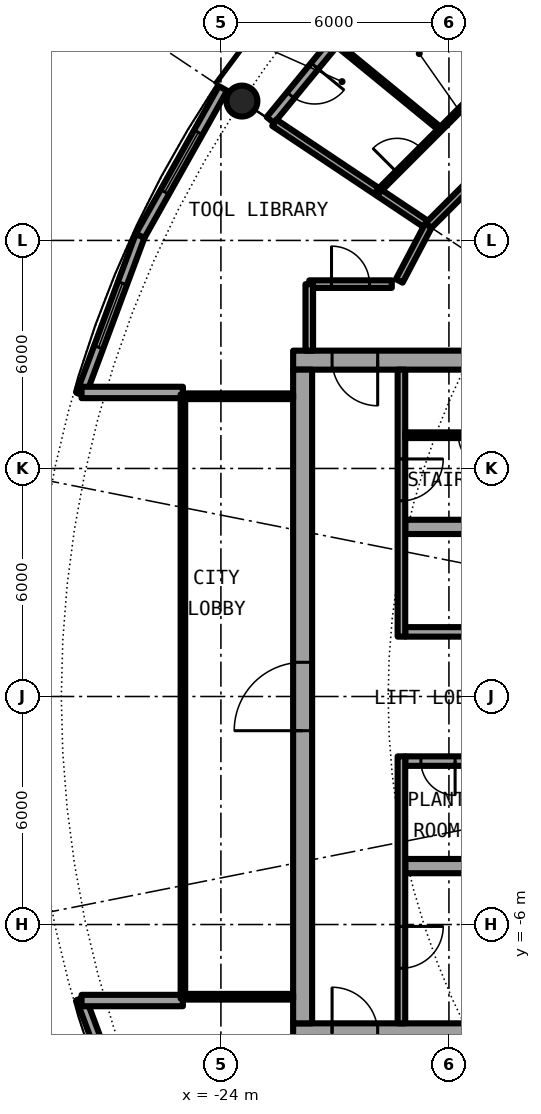
"""IFC4 building model, lengths in metres.
Left out: names, types, materials, properties, quantities, classifications, styles, units other than length and angle.
Written with IfcOpenShell. Run it as: python <this file> out.ifc"""

import sys

from ifc_helpers import new_model, si_unit, direction, frame, frame_2d, origin, origin_2d, place, context, subcontext, project, spatial, rectangle, hollow_circle, extrude, element, fill, save


model = new_model("IFC4")
c1 = context("Model", 3, precision=1e-05, world=origin(), true_north=direction((0.0, 1.0)))
c2 = subcontext(c1, "Body", "Model", "MODEL_VIEW")
j1 = project(units=[si_unit("LENGTHUNIT", "METRE"), si_unit("PLANEANGLEUNIT", "RADIAN")], contexts=[c1])
p1 = place(None, origin())
s1 = spatial("IfcSite", under=j1, at=p1, CompositionType="ELEMENT")
p2 = place(p1, origin())
s2 = spatial("IfcBuilding", under=s1, at=p2, CompositionType="ELEMENT")
p3 = place(p2, frame((0.0, 0.0, 167.7)))
s3 = spatial("IfcBuildingStorey", under=s2, at=p3, CompositionType="ELEMENT", Elevation=167.7)
p4 = place(p3, frame((-23.448, 15.667, 0.0), z_axis=(0.0, 0.0, 1.0), x_axis=(1.0, 0.0, 0.0)))
e1 = element("IfcColumn", 1, at=p4, inside=s3, PredefinedType="COLUMN", context=c2, shape_type="SweptSolid", body=[
    extrude(hollow_circle(Radius=0.406, WallThickness=0.04, at=origin_2d()), origin(), (0.0, 0.0, 1.0), 3.05),
])
p5 = place(p3, frame((-19.304, 19.304, 0.0), z_axis=(0.0, 0.0, 1.0), x_axis=(-0.634382322723, -0.773019449054, 0.0)))
e2 = element("IfcWall", 2, at=p5, inside=s3, PredefinedType="SOLIDWALL", context=c2, shape_type="SweptSolid", body=[
    extrude(rectangle(XDim=5.352, YDim=0.25, at=frame_2d((2.676, 0.0))), origin(), (0.0, 0.0, 1.0), 2.7),
])
p6 = place(p5, frame((0.441, 0.0, 0.3)))
e3 = element("IfcOpeningElement", 3, at=p6, cuts=e2, PredefinedType="OPENING", context=c2, shape_type="SweptSolid", body=[
    extrude(rectangle(XDim=1.8, YDim=2.1, at=frame_2d((0.9, 1.05))), frame((0.0, 0.135, 0.0), z_axis=(0.0, -1.0, 0.0), x_axis=(1.0, 0.0, 0.0)), (0.0, 0.0, 1.0), 0.27),
])
p7 = place(p5, frame((3.51, 0.0, 0.0)))
e4 = element("IfcOpeningElement", 4, at=p7, cuts=e2, PredefinedType="OPENING", context=c2, shape_type="SweptSolid", body=[
    extrude(rectangle(XDim=1.0, YDim=2.2, at=frame_2d((0.5, 1.1))), frame((0.0, 0.135, 0.0), z_axis=(0.0, -1.0, 0.0), x_axis=(1.0, 0.0, 0.0)), (0.0, 0.0, 1.0), 0.27),
])
p8 = place(p3, frame((-27.682, -7.945, 0.0), z_axis=(0.0, 0.0, 1.0), x_axis=(0.349247811493, -0.937030397675, 0.0)))
e5 = element("IfcWall", 5, at=p8, inside=s3, PredefinedType="SOLIDWALL", context=c2, shape_type="SweptSolid", body=[
    extrude(rectangle(XDim=4.452, YDim=0.25, at=frame_2d((2.226, 0.0))), origin(), (0.0, 0.0, 1.0), 2.7),
])
p9 = place(p8, frame((1.327, 0.0, 0.3)))
e6 = element("IfcOpeningElement", 6, at=p9, cuts=e5, PredefinedType="OPENING", context=c2, shape_type="SweptSolid", body=[
    extrude(rectangle(XDim=1.8, YDim=2.1, at=frame_2d((0.9, 1.05))), frame((0.0, 0.135, 0.0), z_axis=(0.0, -1.0, 0.0), x_axis=(1.0, 0.0, 0.0)), (0.0, 0.0, 1.0), 0.27),
])
p10 = place(p3, frame((-23.946, 16.0, 0.0), z_axis=(0.0, 0.0, 1.0), x_axis=(-0.489696356642, -0.871893042919, 0.0)))
e7 = element("IfcWall", 7, at=p10, inside=s3, PredefinedType="SOLIDWALL", context=c2, shape_type="SweptSolid", body=[
    extrude(rectangle(XDim=4.454, YDim=0.25, at=frame_2d((2.227, 0.0))), origin(), (0.0, 0.0, 1.0), 2.7),
])
p11 = place(p10, frame((1.327, 0.0, 0.3)))
e8 = element("IfcOpeningElement", 8, at=p11, cuts=e7, PredefinedType="OPENING", context=c2, shape_type="SweptSolid", body=[
    extrude(rectangle(XDim=1.8, YDim=2.1, at=frame_2d((0.9, 1.05))), frame((0.0, 0.135, 0.0), z_axis=(0.0, -1.0, 0.0), x_axis=(1.0, 0.0, 0.0)), (0.0, 0.0, 1.0), 0.27),
])
p12 = place(p3, frame((-26.127, 12.117, 0.0), z_axis=(0.0, 0.0, 1.0), x_axis=(-0.349247811493, -0.937030397675, 0.0)))
e9 = element("IfcWall", 9, at=p12, inside=s3, PredefinedType="SOLIDWALL", context=c2, shape_type="SweptSolid", body=[
    extrude(rectangle(XDim=4.452, YDim=0.25, at=frame_2d((2.226, 0.0))), origin(), (0.0, 0.0, 1.0), 2.7),
])
p13 = place(p12, frame((1.327, 0.0, 0.3)))
e10 = element("IfcOpeningElement", 10, at=p13, cuts=e9, PredefinedType="OPENING", context=c2, shape_type="SweptSolid", body=[
    extrude(rectangle(XDim=1.8, YDim=2.1, at=frame_2d((0.9, 1.05))), frame((0.0, 0.135, 0.0), z_axis=(0.0, -1.0, 0.0), x_axis=(1.0, 0.0, 0.0)), (0.0, 0.0, 1.0), 0.27),
])
for number, where, z_axis, x_axis in (
    (11, (-25.0, 8.0, 0.0), (0.0, 0.0, 1.0), (-1.0, 0.0, 0.0)),
    (12, (-25.0, -8.0, 0.0), (0.0, 0.0, 1.0), (-1.0, 0.0, 0.0)),
):
    element("IfcWall", number, at=place(p3, frame(where, z_axis=z_axis, x_axis=x_axis)), inside=s3, PredefinedType="SOLIDWALL", context=c2, shape_type="SweptSolid", body=[
        extrude(rectangle(XDim=2.667, YDim=0.3, at=frame_2d((1.333, 0.0))), origin(), (0.0, 0.0, 1.0), 2.7),
    ])
p14 = place(p3, frame((-22.1, -8.85, 0.0), z_axis=(0.0, 0.0, 1.0), x_axis=(1.0, 0.0, 0.0)))
e13 = element("IfcWall", 13, at=p14, inside=s3, PredefinedType="SHEAR", context=c2, shape_type="SweptSolid", body=[
    extrude(rectangle(XDim=13.6, YDim=0.5, at=frame_2d((6.8, 0.0))), origin(), (0.0, 0.0, 1.0), 3.05),
])
p15 = place(p14, frame((1.025, 0.0, 0.0)))
e14 = element("IfcOpeningElement", 14, at=p15, cuts=e13, PredefinedType="OPENING", context=c2, shape_type="SweptSolid", body=[
    extrude(rectangle(XDim=1.2, YDim=2.3, at=frame_2d((0.6, 1.15))), frame((0.0, 0.26, 0.0), z_axis=(0.0, -1.0, 0.0), x_axis=(1.0, 0.0, 0.0)), (0.0, 0.0, 1.0), 0.52),
])
p16 = place(p3, frame((-8.5, 8.85, 0.0), z_axis=(0.0, 0.0, 1.0), x_axis=(-1.0, 0.0, 0.0)))
e15 = element("IfcWall", 15, at=p16, inside=s3, PredefinedType="SHEAR", context=c2, shape_type="SweptSolid", body=[
    extrude(rectangle(XDim=13.6, YDim=0.5, at=frame_2d((6.8, 0.0))), origin(), (0.0, 0.0, 1.0), 3.05),
])
p17 = place(p16, frame((11.375, 0.0, 0.0)))
e16 = element("IfcOpeningElement", 16, at=p17, cuts=e15, PredefinedType="OPENING", context=c2, shape_type="SweptSolid", body=[
    extrude(rectangle(XDim=1.2, YDim=2.3, at=frame_2d((0.6, 1.15))), frame((0.0, 0.26, 0.0), z_axis=(0.0, -1.0, 0.0), x_axis=(1.0, 0.0, 0.0)), (0.0, 0.0, 1.0), 0.52),
])
p18 = place(p3, frame((-21.85, -8.6, 0.0), z_axis=(0.0, 0.0, 1.0), x_axis=(0.0, 1.0, 0.0)))
e17 = element("IfcWall", 17, at=p18, inside=s3, PredefinedType="SHEAR", context=c2, shape_type="SweptSolid", body=[
    extrude(rectangle(XDim=17.2, YDim=0.5, at=frame_2d((8.6, 0.0))), origin(), (0.0, 0.0, 1.0), 3.05),
])
p19 = place(p18, frame((7.7, 0.0, 0.0)))
e18 = element("IfcOpeningElement", 18, at=p19, cuts=e17, PredefinedType="OPENING", context=c2, shape_type="SweptSolid", body=[
    extrude(rectangle(XDim=1.8, YDim=2.3, at=frame_2d((0.9, 1.15))), frame((0.0, 0.26, 0.0), z_axis=(0.0, -1.0, 0.0), x_axis=(1.0, 0.0, 0.0)), (0.0, 0.0, 1.0), 0.52),
])
p20 = place(p3, frame((-9.0, -1.7, 0.0), z_axis=(0.0, 0.0, 1.0), x_axis=(-1.0, 0.0, 0.0)))
e19 = element("IfcWall", 19, at=p20, inside=s3, PredefinedType="SHEAR", context=c2, shape_type="SweptSolid", body=[
    extrude(rectangle(XDim=10.15, YDim=0.25, at=frame_2d((5.075, 0.0))), origin(), (0.0, 0.0, 1.0), 3.05),
])
p21 = place(p20, frame((1.663, 0.0, 0.0)))
e20 = element("IfcOpeningElement", 20, at=p21, cuts=e19, PredefinedType="OPENING", context=c2, shape_type="SweptSolid", body=[
    extrude(rectangle(XDim=0.9, YDim=2.3, at=frame_2d((0.45, 1.15))), frame((0.0, 0.135, 0.0), z_axis=(0.0, -1.0, 0.0), x_axis=(1.0, 0.0, 0.0)), (0.0, 0.0, 1.0), 0.27),
])
p22 = place(p20, frame((4.675, 0.0, 0.0)))
e21 = element("IfcOpeningElement", 21, at=p22, cuts=e19, PredefinedType="OPENING", context=c2, shape_type="SweptSolid", body=[
    extrude(rectangle(XDim=0.9, YDim=2.3, at=frame_2d((0.45, 1.15))), frame((0.0, 0.135, 0.0), z_axis=(0.0, -1.0, 0.0), x_axis=(1.0, 0.0, 0.0)), (0.0, 0.0, 1.0), 0.27),
])
p23 = place(p20, frame((8.837, 0.0, 0.0)))
e22 = element("IfcOpeningElement", 22, at=p23, cuts=e19, PredefinedType="OPENING", context=c2, shape_type="SweptSolid", body=[
    extrude(rectangle(XDim=0.9, YDim=2.3, at=frame_2d((0.45, 1.15))), frame((0.0, 0.135, 0.0), z_axis=(0.0, -1.0, 0.0), x_axis=(1.0, 0.0, 0.0)), (0.0, 0.0, 1.0), 0.27),
])
p24 = place(p3, frame((-9.0, -4.462, 0.0), z_axis=(0.0, 0.0, 1.0), x_axis=(-1.0, 0.0, 0.0)))
e23 = element("IfcWall", 23, at=p24, inside=s3, PredefinedType="SHEAR", context=c2, shape_type="SweptSolid", body=[
    extrude(rectangle(XDim=10.15, YDim=0.375, at=frame_2d((5.075, 0.0))), origin(), (0.0, 0.0, 1.0), 3.05),
])
p25 = place(p24, frame((6.6, 0.0, 0.0)))
e24 = element("IfcOpeningElement", 24, at=p25, cuts=e23, PredefinedType="OPENING", context=c2, shape_type="SweptSolid", body=[
    extrude(rectangle(XDim=1.1, YDim=2.3, at=frame_2d((0.55, 1.15))), frame((0.0, 0.198, 0.0), z_axis=(0.0, -1.0, 0.0), x_axis=(1.0, 0.0, 0.0)), (0.0, 0.0, 1.0), 0.395),
])
p26 = place(p3, frame((-19.25, -1.575, 0.0), z_axis=(0.0, 0.0, 1.0), x_axis=(0.0, -1.0, 0.0)))
e25 = element("IfcWall", 25, at=p26, inside=s3, PredefinedType="SOLIDWALL", context=c2, shape_type="SweptSolid", body=[
    extrude(rectangle(XDim=7.025, YDim=0.2, at=frame_2d((3.513, 0.0))), origin(), (0.0, 0.0, 1.0), 2.7),
])
p27 = place(p26, frame((4.475, 0.0, 0.0)))
e26 = element("IfcOpeningElement", 26, at=p27, cuts=e25, PredefinedType="OPENING", context=c2, shape_type="SweptSolid", body=[
    extrude(rectangle(XDim=1.1, YDim=2.3, at=frame_2d((0.55, 1.15))), frame((0.0, 0.11, 0.0), z_axis=(0.0, -1.0, 0.0), x_axis=(1.0, 0.0, 0.0)), (0.0, 0.0, 1.0), 0.22),
])
p28 = place(p3, frame((-9.0, 1.7, 0.0), z_axis=(0.0, 0.0, 1.0), x_axis=(-1.0, 0.0, 0.0)))
e27 = element("IfcWall", 27, at=p28, inside=s3, PredefinedType="SHEAR", context=c2, shape_type="SweptSolid", body=[
    extrude(rectangle(XDim=10.15, YDim=0.25, at=frame_2d((5.075, 0.0))), origin(), (0.0, 0.0, 1.0), 3.05),
])
p29 = place(p28, frame((0.387, 0.0, 0.0)))
e28 = element("IfcOpeningElement", 28, at=p29, cuts=e27, PredefinedType="OPENING", context=c2, shape_type="SweptSolid", body=[
    extrude(rectangle(XDim=1.1, YDim=2.3, at=frame_2d((0.55, 1.15))), frame((0.0, 0.135, 0.0), z_axis=(0.0, -1.0, 0.0), x_axis=(1.0, 0.0, 0.0)), (0.0, 0.0, 1.0), 0.27),
])
p30 = place(p28, frame((2.45, 0.0, 0.0)))
e29 = element("IfcOpeningElement", 29, at=p30, cuts=e27, PredefinedType="OPENING", context=c2, shape_type="SweptSolid", body=[
    extrude(rectangle(XDim=1.1, YDim=2.3, at=frame_2d((0.55, 1.15))), frame((0.0, 0.135, 0.0), z_axis=(0.0, -1.0, 0.0), x_axis=(1.0, 0.0, 0.0)), (0.0, 0.0, 1.0), 0.27),
])
p31 = place(p28, frame((4.45, 0.0, 0.0)))
e30 = element("IfcOpeningElement", 30, at=p31, cuts=e27, PredefinedType="OPENING", context=c2, shape_type="SweptSolid", body=[
    extrude(rectangle(XDim=1.1, YDim=2.3, at=frame_2d((0.55, 1.15))), frame((0.0, 0.135, 0.0), z_axis=(0.0, -1.0, 0.0), x_axis=(1.0, 0.0, 0.0)), (0.0, 0.0, 1.0), 0.27),
])
p32 = place(p28, frame((6.6, 0.0, 0.0)))
e31 = element("IfcOpeningElement", 31, at=p32, cuts=e27, PredefinedType="OPENING", context=c2, shape_type="SweptSolid", body=[
    extrude(rectangle(XDim=1.1, YDim=2.3, at=frame_2d((0.55, 1.15))), frame((0.0, 0.135, 0.0), z_axis=(0.0, -1.0, 0.0), x_axis=(1.0, 0.0, 0.0)), (0.0, 0.0, 1.0), 0.27),
])
p33 = place(p3, frame((-9.0, 4.462, 0.0), z_axis=(0.0, 0.0, 1.0), x_axis=(-1.0, 0.0, 0.0)))
e32 = element("IfcWall", 32, at=p33, inside=s3, PredefinedType="SHEAR", context=c2, shape_type="SweptSolid", body=[
    extrude(rectangle(XDim=10.15, YDim=0.375, at=frame_2d((5.075, 0.0))), origin(), (0.0, 0.0, 1.0), 3.05),
])
p34 = place(p3, frame((-19.25, 8.6, 0.0), z_axis=(0.0, 0.0, 1.0), x_axis=(0.0, -1.0, 0.0)))
e33 = element("IfcWall", 33, at=p34, inside=s3, PredefinedType="SOLIDWALL", context=c2, shape_type="SweptSolid", body=[
    extrude(rectangle(XDim=7.025, YDim=0.2, at=frame_2d((3.513, 0.0))), origin(), (0.0, 0.0, 1.0), 2.7),
])
p35 = place(p34, frame((2.35, 0.0, 0.0)))
e34 = element("IfcOpeningElement", 34, at=p35, cuts=e33, PredefinedType="OPENING", context=c2, shape_type="SweptSolid", body=[
    extrude(rectangle(XDim=1.1, YDim=2.3, at=frame_2d((0.55, 1.15))), frame((0.0, 0.11, 0.0), z_axis=(0.0, -1.0, 0.0), x_axis=(1.0, 0.0, 0.0)), (0.0, 0.0, 1.0), 0.22),
])
p36 = place(p3, frame((-15.45, 6.875, 0.0), z_axis=(0.0, 0.0, 1.0), x_axis=(-1.0, 0.0, 0.0)))
e35 = element("IfcWall", 35, at=p36, inside=s3, PredefinedType="PARTITIONING", context=c2, shape_type="SweptSolid", body=[
    extrude(rectangle(XDim=3.7, YDim=0.15, at=frame_2d((1.85, 0.0))), origin(), (0.0, 0.0, 1.0), 2.7),
])
p37 = place(p36, frame((1.4, 0.0, 0.0)))
e36 = element("IfcOpeningElement", 36, at=p37, cuts=e35, PredefinedType="OPENING", context=c2, shape_type="SweptSolid", body=[
    extrude(rectangle(XDim=0.9, YDim=2.3, at=frame_2d((0.45, 1.15))), frame((0.0, 0.085, 0.0), z_axis=(0.0, -1.0, 0.0), x_axis=(1.0, 0.0, 0.0)), (0.0, 0.0, 1.0), 0.17),
])
for number, where, z_axis, x_axis in (
    (37, (-22.1, 7.9, 0.0), (0.0, 0.0, 1.0), (-1.0, 0.0, 0.0)),
    (38, (-22.1, -7.9, 0.0), (0.0, 0.0, 1.0), (-1.0, 0.0, 0.0)),
):
    element("IfcWall", number, at=place(p3, frame(where, z_axis=z_axis, x_axis=x_axis)), inside=s3, PredefinedType="PARTITIONING", context=c2, shape_type="SweptSolid", body=[
        extrude(rectangle(XDim=2.84, YDim=0.15, at=frame_2d((1.42, 0.0))), origin(), (0.0, 0.0, 1.0), 2.7),
    ])
p38 = place(p3, frame((-25.0, 7.95, 0.0), z_axis=(0.0, 0.0, 1.0), x_axis=(0.0, -1.0, 0.0)))
e39 = element("IfcWall", 39, at=p38, inside=s3, PredefinedType="PARTITIONING", context=c2, shape_type="SweptSolid", body=[
    extrude(rectangle(XDim=15.9, YDim=0.12, at=frame_2d((7.95, 0.0))), origin(), (0.0, 0.0, 1.0), 2.7),
])
p39 = place(p38, frame((0.95, 0.0, 0.1)))
e40 = element("IfcOpeningElement", 40, at=p39, cuts=e39, PredefinedType="OPENING", context=c2, shape_type="SweptSolid", body=[
    extrude(rectangle(XDim=14.0, YDim=2.35, at=frame_2d((7.0, 1.175))), frame((0.0, 0.07, 0.0), z_axis=(0.0, -1.0, 0.0), x_axis=(1.0, 0.0, 0.0)), (0.0, 0.0, 1.0), 0.14),
])
p40 = place(p3, frame((-22.595, 15.098, 0.0), z_axis=(0.0, 0.0, 1.0), x_axis=(0.831387096605, -0.55569370664, 0.0)))
e41 = element("IfcWall", 41, at=p40, inside=s3, PredefinedType="PARTITIONING", context=c2, shape_type="SweptSolid", body=[
    extrude(rectangle(XDim=4.875, YDim=0.2, at=frame_2d((2.438, 0.0))), origin(), (0.0, 0.0, 1.0), 2.7),
])
p41 = place(p3, frame((-21.023, 17.22, 0.0), z_axis=(0.0, 0.0, 1.0), x_axis=(0.773548271597, -0.633737383709, 0.0)))
e42 = element("IfcWall", 42, at=p41, inside=s3, PredefinedType="PARTITIONING", context=c2, shape_type="SweptSolid", body=[
    extrude(rectangle(XDim=3.618, YDim=0.1, at=frame_2d((1.809, 0.0))), origin(), (0.0, 0.0, 1.0), 2.7),
])
p42 = place(p3, frame((-19.216, 19.216, 0.0), z_axis=(0.0, 0.0, 1.0), x_axis=(0.707106781187, -0.707106781187, 0.0)))
e43 = element("IfcWall", 43, at=p42, inside=s3, PredefinedType="PARTITIONING", context=c2, shape_type="SweptSolid", body=[
    extrude(rectangle(XDim=3.735, YDim=0.1, at=frame_2d((1.868, 0.0))), origin(), (0.0, 0.0, 1.0), 2.7),
])
p43 = place(p42, frame((1.417, 0.0, 0.0)))
e44 = element("IfcOpeningElement", 44, at=p43, cuts=e43, PredefinedType="OPENING", context=c2, shape_type="SweptSolid", body=[
    extrude(rectangle(XDim=0.9, YDim=2.3, at=frame_2d((0.45, 1.15))), frame((0.0, 0.06, 0.0), z_axis=(0.0, -1.0, 0.0), x_axis=(1.0, 0.0, 0.0)), (0.0, 0.0, 1.0), 0.12),
])
p44 = place(p3, frame((-21.675, 10.85, 0.0), z_axis=(0.0, 0.0, 1.0), x_axis=(1.0, 0.0, 0.0)))
e45 = element("IfcWall", 45, at=p44, inside=s3, PredefinedType="PARTITIONING", context=c2, shape_type="SweptSolid", body=[
    extrude(rectangle(XDim=2.171, YDim=0.2, at=frame_2d((1.085, 0.0))), origin(), (0.0, 0.0, 1.0), 2.7),
])
p45 = place(p44, frame((0.585, 0.0, 0.0)))
e46 = element("IfcOpeningElement", 46, at=p45, cuts=e45, PredefinedType="OPENING", context=c2, shape_type="SweptSolid", body=[
    extrude(rectangle(XDim=1.0, YDim=2.3, at=frame_2d((0.5, 1.15))), frame((0.0, 0.11, 0.0), z_axis=(0.0, -1.0, 0.0), x_axis=(1.0, 0.0, 0.0)), (0.0, 0.0, 1.0), 0.22),
])
p46 = place(p3, frame((-21.675, 9.1, 0.0), z_axis=(0.0, 0.0, 1.0), x_axis=(0.0, 1.0, 0.0)))
e47 = element("IfcWall", 47, at=p46, inside=s3, PredefinedType="PARTITIONING", context=c2, shape_type="SweptSolid", body=[
    extrude(rectangle(XDim=1.75, YDim=0.2, at=frame_2d((0.875, 0.0))), origin(), (0.0, 0.0, 1.0), 2.7),
])
p47 = place(p3, frame((-18.542, 12.389, 0.0), z_axis=(0.0, 0.0, 1.0), x_axis=(0.707106781187, 0.707106781187, 0.0)))
e48 = element("IfcWall", 48, at=p47, inside=s3, PredefinedType="PARTITIONING", context=c2, shape_type="SweptSolid", body=[
    extrude(rectangle(XDim=8.702, YDim=0.2, at=frame_2d((4.351, 0.0))), origin(), (0.0, 0.0, 1.0), 2.7),
])
p48 = place(p47, frame((2.763, 0.0, 0.0)))
e49 = element("IfcOpeningElement", 49, at=p48, cuts=e48, PredefinedType="OPENING", context=c2, shape_type="SweptSolid", body=[
    extrude(rectangle(XDim=1.0, YDim=2.3, at=frame_2d((0.5, 1.15))), frame((0.0, 0.11, 0.0), z_axis=(0.0, -1.0, 0.0), x_axis=(1.0, 0.0, 0.0)), (0.0, 0.0, 1.0), 0.22),
])
p49 = place(p3, frame((-19.307, 10.935, 0.0), z_axis=(0.0, 0.0, 1.0), x_axis=(0.465605550524, 0.884992356646, 0.0)))
e50 = element("IfcWall", 50, at=p49, inside=s3, PredefinedType="PARTITIONING", context=c2, shape_type="SweptSolid", body=[
    extrude(rectangle(XDim=1.643, YDim=0.2, at=frame_2d((0.821, 0.0))), origin(), (0.0, 0.0, 1.0), 2.7),
])
p50 = place(p3, frame((-19.872, 13.278, 0.0), z_axis=(0.0, 0.0, 1.0), x_axis=(0.707132961115, 0.707080600289, 0.0)))
e51 = element("IfcWall", 51, at=p50, inside=s3, PredefinedType="PARTITIONING", context=c2, shape_type="SweptSolid", body=[
    extrude(rectangle(XDim=4.663, YDim=0.1, at=frame_2d((2.331, 0.0))), origin(), (0.0, 0.0, 1.0), 2.7),
])
p51 = place(p50, frame((0.719, 0.0, 0.0)))
e52 = element("IfcOpeningElement", 52, at=p51, cuts=e51, PredefinedType="OPENING", context=c2, shape_type="SweptSolid", body=[
    extrude(rectangle(XDim=0.9, YDim=2.3, at=frame_2d((0.45, 1.15))), frame((0.0, 0.06, 0.0), z_axis=(0.0, -1.0, 0.0), x_axis=(1.0, 0.0, 0.0)), (0.0, 0.0, 1.0), 0.12),
])
p52 = place(p7, origin())
e53 = element("IfcDoor", 53, at=p52, inside=s3, OperationType="SINGLE_SWING_LEFT", PredefinedType="DOOR", context=c2, shape_type="SweptSolid", body=[
    extrude(rectangle(XDim=1.0, YDim=2.2, at=frame_2d((0.5, 1.1))), frame((0.0, 0.025, 0.0), z_axis=(0.0, -1.0, 0.0), x_axis=(1.0, 0.0, 0.0)), (0.0, 0.0, 1.0), 0.05),
])
fill(e4, e53)
p53 = place(p11, origin())
e54 = element("IfcWindow", 54, at=p53, inside=s3, PartitioningType="SINGLE_PANEL", PredefinedType="WINDOW", context=c2, shape_type="SweptSolid", body=[
    extrude(rectangle(XDim=1.8, YDim=2.1, at=frame_2d((0.9, 1.05))), frame((0.0, 0.03, 0.0), z_axis=(0.0, -1.0, 0.0), x_axis=(1.0, 0.0, 0.0)), (0.0, 0.0, 1.0), 0.06),
])
fill(e8, e54)
p54 = place(p13, origin())
e55 = element("IfcWindow", 55, at=p54, inside=s3, PartitioningType="SINGLE_PANEL", PredefinedType="WINDOW", context=c2, shape_type="SweptSolid", body=[
    extrude(rectangle(XDim=1.8, YDim=2.1, at=frame_2d((0.9, 1.05))), frame((0.0, 0.03, 0.0), z_axis=(0.0, -1.0, 0.0), x_axis=(1.0, 0.0, 0.0)), (0.0, 0.0, 1.0), 0.06),
])
fill(e10, e55)
p55 = place(p23, origin())
e56 = element("IfcDoor", 56, at=p55, inside=s3, OperationType="SINGLE_SWING_LEFT", PredefinedType="DOOR", context=c2, shape_type="SweptSolid", body=[
    extrude(rectangle(XDim=0.9, YDim=2.3, at=frame_2d((0.45, 1.15))), frame((0.0, 0.025, 0.0), z_axis=(0.0, -1.0, 0.0), x_axis=(1.0, 0.0, 0.0)), (0.0, 0.0, 1.0), 0.05),
])
fill(e22, e56)
p56 = place(p37, origin())
e57 = element("IfcDoor", 57, at=p56, inside=s3, OperationType="SINGLE_SWING_LEFT", PredefinedType="DOOR", context=c2, shape_type="SweptSolid", body=[
    extrude(rectangle(XDim=0.9, YDim=2.3, at=frame_2d((0.45, 1.15))), frame((0.0, 0.025, 0.0), z_axis=(0.0, -1.0, 0.0), x_axis=(1.0, 0.0, 0.0)), (0.0, 0.0, 1.0), 0.05),
])
fill(e36, e57)
p57 = place(p27, origin())
e58 = element("IfcDoor", 58, at=p57, inside=s3, OperationType="SINGLE_SWING_LEFT", PredefinedType="DOOR", context=c2, shape_type="SweptSolid", body=[
    extrude(rectangle(XDim=1.1, YDim=2.3, at=frame_2d((0.55, 1.15))), frame((0.0, 0.025, 0.0), z_axis=(0.0, -1.0, 0.0), x_axis=(1.0, 0.0, 0.0)), (0.0, 0.0, 1.0), 0.05),
])
fill(e26, e58)
p58 = place(p35, origin())
e59 = element("IfcDoor", 59, at=p58, inside=s3, OperationType="SINGLE_SWING_RIGHT", PredefinedType="DOOR", context=c2, shape_type="SweptSolid", body=[
    extrude(rectangle(XDim=1.1, YDim=2.3, at=frame_2d((0.55, 1.15))), frame((0.0, 0.025, 0.0), z_axis=(0.0, -1.0, 0.0), x_axis=(1.0, 0.0, 0.0)), (0.0, 0.0, 1.0), 0.05),
])
fill(e34, e59)
p59 = place(p15, origin())
e60 = element("IfcDoor", 60, at=p59, inside=s3, OperationType="SINGLE_SWING_RIGHT", PredefinedType="DOOR", context=c2, shape_type="SweptSolid", body=[
    extrude(rectangle(XDim=1.2, YDim=2.3, at=frame_2d((0.6, 1.15))), frame((0.0, 0.025, 0.0), z_axis=(0.0, -1.0, 0.0), x_axis=(1.0, 0.0, 0.0)), (0.0, 0.0, 1.0), 0.05),
])
fill(e14, e60)
p60 = place(p17, origin())
e61 = element("IfcDoor", 61, at=p60, inside=s3, OperationType="SINGLE_SWING_LEFT", PredefinedType="DOOR", context=c2, shape_type="SweptSolid", body=[
    extrude(rectangle(XDim=1.2, YDim=2.3, at=frame_2d((0.6, 1.15))), frame((0.0, 0.025, 0.0), z_axis=(0.0, -1.0, 0.0), x_axis=(1.0, 0.0, 0.0)), (0.0, 0.0, 1.0), 0.05),
])
fill(e16, e61)
p61 = place(p19, origin())
e62 = element("IfcDoor", 62, at=p61, inside=s3, OperationType="SINGLE_SWING_LEFT", PredefinedType="DOOR", context=c2, shape_type="SweptSolid", body=[
    extrude(rectangle(XDim=1.8, YDim=2.3, at=frame_2d((0.9, 1.15))), frame((0.0, 0.025, 0.0), z_axis=(0.0, -1.0, 0.0), x_axis=(1.0, 0.0, 0.0)), (0.0, 0.0, 1.0), 0.05),
])
fill(e18, e62)
p62 = place(p39, origin())
e63 = element("IfcWindow", 63, at=p62, inside=s3, PartitioningType="SINGLE_PANEL", PredefinedType="WINDOW", context=c2, shape_type="SweptSolid", body=[
    extrude(rectangle(XDim=14.0, YDim=2.35, at=frame_2d((7.0, 1.175))), frame((0.0, 0.03, 0.0), z_axis=(0.0, -1.0, 0.0), x_axis=(1.0, 0.0, 0.0)), (0.0, 0.0, 1.0), 0.06),
])
fill(e40, e63)
p63 = place(p51, origin())
e64 = element("IfcDoor", 64, at=p63, inside=s3, OperationType="SINGLE_SWING_LEFT", PredefinedType="DOOR", context=c2, shape_type="SweptSolid", body=[
    extrude(rectangle(XDim=0.9, YDim=2.3, at=frame_2d((0.45, 1.15))), frame((0.0, 0.025, 0.0), z_axis=(0.0, -1.0, 0.0), x_axis=(1.0, 0.0, 0.0)), (0.0, 0.0, 1.0), 0.05),
])
fill(e52, e64)
p64 = place(p45, origin())
e65 = element("IfcDoor", 65, at=p64, inside=s3, OperationType="SINGLE_SWING_LEFT", PredefinedType="DOOR", context=c2, shape_type="SweptSolid", body=[
    extrude(rectangle(XDim=1.0, YDim=2.3, at=frame_2d((0.5, 1.15))), frame((0.0, 0.025, 0.0), z_axis=(0.0, -1.0, 0.0), x_axis=(1.0, 0.0, 0.0)), (0.0, 0.0, 1.0), 0.05),
])
fill(e46, e65)
save(model, sys.argv[1])
